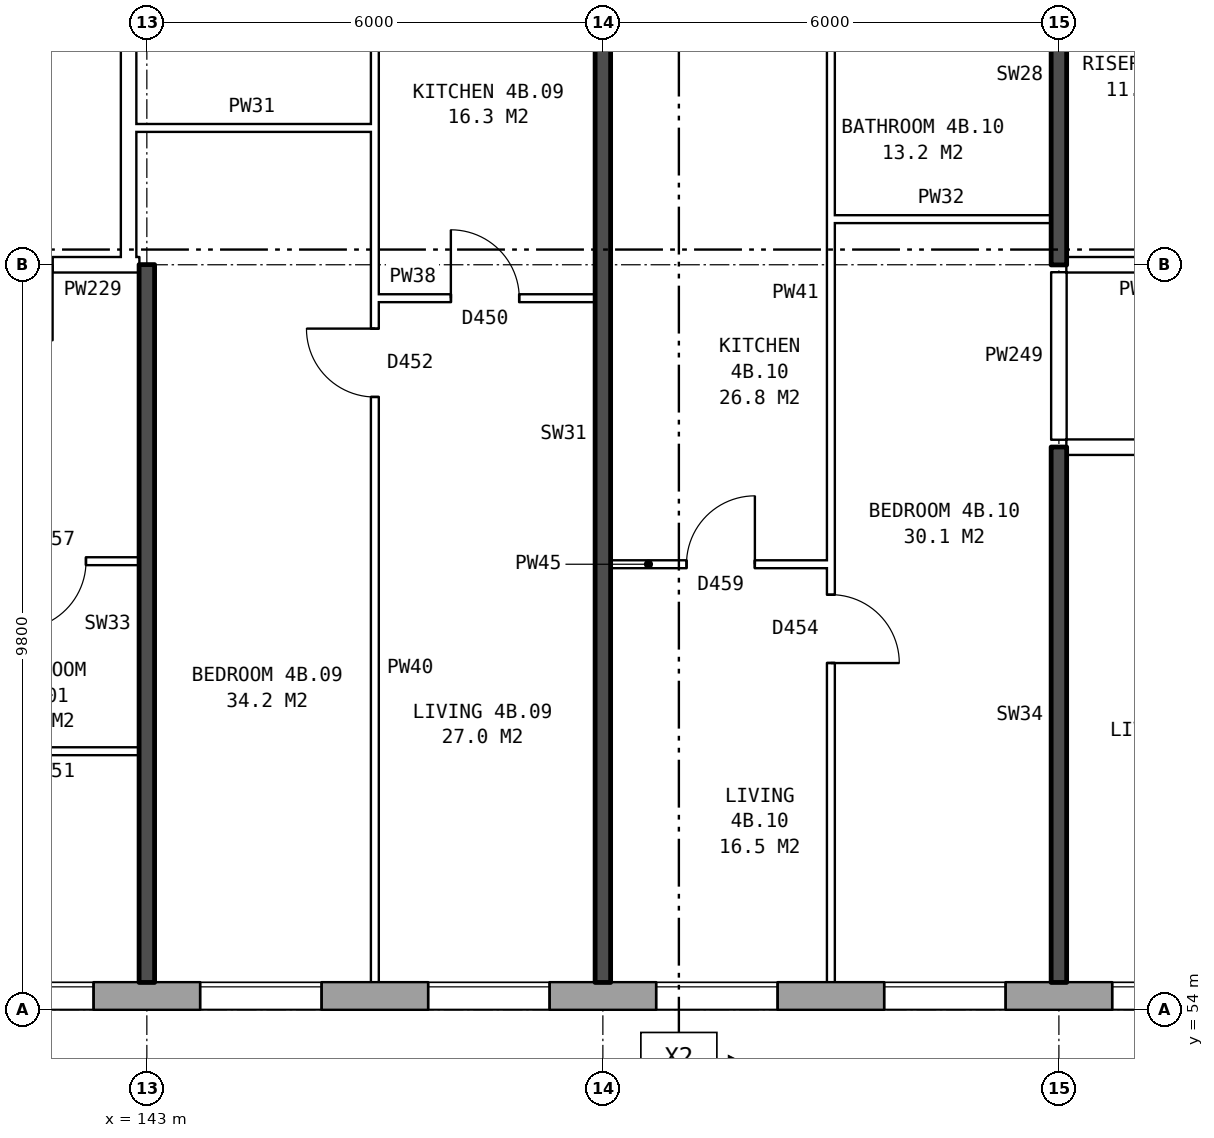
"""IFC4 building model, lengths in metres.
Left out: names, types, materials, properties, quantities, classifications, styles, units other than length and angle.
Written with IfcOpenShell. Run it as: python <this file> out.ifc"""

import sys

from ifc_helpers import new_model, si_unit, direction, frame, frame_2d, origin, place, context, subcontext, project, spatial, rectangle, extrude, element, fill, save


model = new_model("IFC4")
c1 = context("Model", 3, precision=1e-05, world=origin(), true_north=direction((0.0, 1.0)))
c2 = subcontext(c1, "Body", "Model", "MODEL_VIEW")
j1 = project(units=[si_unit("LENGTHUNIT", "METRE"), si_unit("PLANEANGLEUNIT", "RADIAN")], contexts=[c1])
p1 = place(None, origin())
s1 = spatial("IfcSite", under=j1, at=p1, CompositionType="ELEMENT")
p2 = place(p1, origin())
s2 = spatial("IfcBuilding", under=s1, at=p2, CompositionType="ELEMENT")
p3 = place(p2, frame((0.0, 0.0, 19.5)))
s3 = spatial("IfcBuildingStorey", under=s2, at=p3, CompositionType="ELEMENT", Elevation=19.5)
p4 = place(p3, frame((134.075, 54.18, 0.0), z_axis=(0.0, 0.0, 1.0), x_axis=(1.0, 0.0, 0.0)))
e1 = element("IfcWall", 1, at=p4, inside=s3, PredefinedType="STANDARD", context=c2, shape_type="SweptSolid", body=[
    extrude(rectangle(XDim=40.601, YDim=0.36, at=frame_2d((20.3, 0.0))), origin(), (0.0, 0.0, 1.0), 2.85),
])
p5 = place(p4, frame((0.3, 0.0, 0.8)))
e2 = element("IfcOpeningElement", 2, at=p5, cuts=e1, PredefinedType="OPENING", context=c2, shape_type="SweptSolid", body=[
    extrude(rectangle(XDim=0.8, YDim=0.9, at=frame_2d((0.4, 0.45))), frame((0.0, 0.19, 0.0), z_axis=(0.0, -1.0, 0.0), x_axis=(1.0, 0.0, 0.0)), (0.0, 0.0, 1.0), 0.38),
])
p6 = place(p4, frame((3.625, 0.0, 0.8)))
e3 = element("IfcOpeningElement", 3, at=p6, cuts=e1, PredefinedType="OPENING", context=c2, shape_type="SweptSolid", body=[
    extrude(rectangle(XDim=1.6, YDim=1.8, at=frame_2d((0.8, 0.9))), frame((0.0, 0.19, 0.0), z_axis=(0.0, -1.0, 0.0), x_axis=(1.0, 0.0, 0.0)), (0.0, 0.0, 1.0), 0.38),
])
p7 = place(p4, frame((6.625, 0.0, 0.8)))
e4 = element("IfcOpeningElement", 4, at=p7, cuts=e1, PredefinedType="OPENING", context=c2, shape_type="SweptSolid", body=[
    extrude(rectangle(XDim=1.6, YDim=1.8, at=frame_2d((0.8, 0.9))), frame((0.0, 0.19, 0.0), z_axis=(0.0, -1.0, 0.0), x_axis=(1.0, 0.0, 0.0)), (0.0, 0.0, 1.0), 0.38),
])
p8 = place(p4, frame((9.625, 0.0, 0.8)))
e5 = element("IfcOpeningElement", 5, at=p8, cuts=e1, PredefinedType="OPENING", context=c2, shape_type="SweptSolid", body=[
    extrude(rectangle(XDim=1.6, YDim=1.8, at=frame_2d((0.8, 0.9))), frame((0.0, 0.19, 0.0), z_axis=(0.0, -1.0, 0.0), x_axis=(1.0, 0.0, 0.0)), (0.0, 0.0, 1.0), 0.38),
])
p9 = place(p4, frame((12.625, 0.0, 0.8)))
e6 = element("IfcOpeningElement", 6, at=p9, cuts=e1, PredefinedType="OPENING", context=c2, shape_type="SweptSolid", body=[
    extrude(rectangle(XDim=1.6, YDim=1.8, at=frame_2d((0.8, 0.9))), frame((0.0, 0.19, 0.0), z_axis=(0.0, -1.0, 0.0), x_axis=(1.0, 0.0, 0.0)), (0.0, 0.0, 1.0), 0.38),
])
p10 = place(p4, frame((15.625, 0.0, 0.8)))
e7 = element("IfcOpeningElement", 7, at=p10, cuts=e1, PredefinedType="OPENING", context=c2, shape_type="SweptSolid", body=[
    extrude(rectangle(XDim=1.6, YDim=1.8, at=frame_2d((0.8, 0.9))), frame((0.0, 0.19, 0.0), z_axis=(0.0, -1.0, 0.0), x_axis=(1.0, 0.0, 0.0)), (0.0, 0.0, 1.0), 0.38),
])
p11 = place(p4, frame((18.625, 0.0, 0.8)))
e8 = element("IfcOpeningElement", 8, at=p11, cuts=e1, PredefinedType="OPENING", context=c2, shape_type="SweptSolid", body=[
    extrude(rectangle(XDim=1.6, YDim=1.8, at=frame_2d((0.8, 0.9))), frame((0.0, 0.19, 0.0), z_axis=(0.0, -1.0, 0.0), x_axis=(1.0, 0.0, 0.0)), (0.0, 0.0, 1.0), 0.38),
])
p12 = place(p4, frame((21.625, 0.0, 0.8)))
e9 = element("IfcOpeningElement", 9, at=p12, cuts=e1, PredefinedType="OPENING", context=c2, shape_type="SweptSolid", body=[
    extrude(rectangle(XDim=1.6, YDim=1.8, at=frame_2d((0.8, 0.9))), frame((0.0, 0.19, 0.0), z_axis=(0.0, -1.0, 0.0), x_axis=(1.0, 0.0, 0.0)), (0.0, 0.0, 1.0), 0.38),
])
p13 = place(p4, frame((24.625, 0.0, 0.8)))
e10 = element("IfcOpeningElement", 10, at=p13, cuts=e1, PredefinedType="OPENING", context=c2, shape_type="SweptSolid", body=[
    extrude(rectangle(XDim=1.6, YDim=1.8, at=frame_2d((0.8, 0.9))), frame((0.0, 0.19, 0.0), z_axis=(0.0, -1.0, 0.0), x_axis=(1.0, 0.0, 0.0)), (0.0, 0.0, 1.0), 0.38),
])
p14 = place(p4, frame((27.625, 0.0, 0.8)))
e11 = element("IfcOpeningElement", 11, at=p14, cuts=e1, PredefinedType="OPENING", context=c2, shape_type="SweptSolid", body=[
    extrude(rectangle(XDim=1.6, YDim=1.8, at=frame_2d((0.8, 0.9))), frame((0.0, 0.19, 0.0), z_axis=(0.0, -1.0, 0.0), x_axis=(1.0, 0.0, 0.0)), (0.0, 0.0, 1.0), 0.38),
])
p15 = place(p4, frame((30.625, 0.0, 0.8)))
e12 = element("IfcOpeningElement", 12, at=p15, cuts=e1, PredefinedType="OPENING", context=c2, shape_type="SweptSolid", body=[
    extrude(rectangle(XDim=1.6, YDim=1.8, at=frame_2d((0.8, 0.9))), frame((0.0, 0.19, 0.0), z_axis=(0.0, -1.0, 0.0), x_axis=(1.0, 0.0, 0.0)), (0.0, 0.0, 1.0), 0.38),
])
p16 = place(p4, frame((33.625, 0.0, 0.8)))
e13 = element("IfcOpeningElement", 13, at=p16, cuts=e1, PredefinedType="OPENING", context=c2, shape_type="SweptSolid", body=[
    extrude(rectangle(XDim=1.6, YDim=1.8, at=frame_2d((0.8, 0.9))), frame((0.0, 0.19, 0.0), z_axis=(0.0, -1.0, 0.0), x_axis=(1.0, 0.0, 0.0)), (0.0, 0.0, 1.0), 0.38),
])
p17 = place(p4, frame((36.625, 0.0, 0.8)))
e14 = element("IfcOpeningElement", 14, at=p17, cuts=e1, PredefinedType="OPENING", context=c2, shape_type="SweptSolid", body=[
    extrude(rectangle(XDim=1.6, YDim=1.8, at=frame_2d((0.8, 0.9))), frame((0.0, 0.19, 0.0), z_axis=(0.0, -1.0, 0.0), x_axis=(1.0, 0.0, 0.0)), (0.0, 0.0, 1.0), 0.38),
])
p18 = place(p4, frame((1.4, 0.0, 0.8)))
e15 = element("IfcOpeningElement", 15, at=p18, cuts=e1, PredefinedType="OPENING", context=c2, shape_type="SweptSolid", body=[
    extrude(rectangle(XDim=1.2, YDim=1.8, at=frame_2d((0.6, 0.9))), frame((0.0, 0.19, 0.0), z_axis=(0.0, -1.0, 0.0), x_axis=(1.0, 0.0, 0.0)), (0.0, 0.0, 1.0), 0.38),
])
p19 = place(p3, frame((142.76, 63.9, 0.0), z_axis=(0.0, 0.0, 1.0), x_axis=(0.0, 1.0, 0.0)))
e16 = element("IfcWall", 16, at=p19, inside=s3, PredefinedType="PARTITIONING", context=c2, shape_type="SweptSolid", body=[
    extrude(rectangle(XDim=12.2, YDim=0.2, at=frame_2d((6.1, 0.0))), origin(), (0.0, 0.0, 1.0), 2.85),
])
p20 = place(p19, frame((5.1, 0.0, 0.0)))
e17 = element("IfcOpeningElement", 17, at=p20, cuts=e16, PredefinedType="OPENING", context=c2, shape_type="SweptSolid", body=[
    extrude(rectangle(XDim=2.0, YDim=2.1, at=frame_2d((1.0, 1.05))), frame((0.0, 0.11, 0.0), z_axis=(0.0, -1.0, 0.0), x_axis=(1.0, 0.0, 0.0)), (0.0, 0.0, 1.0), 0.22),
])
p21 = place(p3, frame((140.6, 57.4, 0.0), z_axis=(0.0, 0.0, 1.0), x_axis=(1.0, 0.0, 0.0)))
e18 = element("IfcWall", 18, at=p21, inside=s3, PredefinedType="PARTITIONING", context=c2, shape_type="SweptSolid", body=[
    extrude(rectangle(XDim=2.3, YDim=0.1, at=frame_2d((1.15, 0.0))), origin(), (0.0, 0.0, 1.0), 2.85),
])
p22 = place(p3, frame((149.1, 59.86, 0.0), z_axis=(0.0, 0.0, 1.0), x_axis=(1.0, 0.0, 0.0)))
e19 = element("IfcWall", 19, at=p22, inside=s3, PredefinedType="PARTITIONING", context=c2, shape_type="SweptSolid", body=[
    extrude(rectangle(XDim=2.9, YDim=0.1, at=frame_2d((1.45, 0.0))), origin(), (0.0, 0.0, 1.0), 2.85),
])
p23 = place(p22, frame((1.0, 0.0, 0.0)))
e20 = element("IfcOpeningElement", 20, at=p23, cuts=e19, PredefinedType="OPENING", context=c2, shape_type="SweptSolid", body=[
    extrude(rectangle(XDim=0.9, YDim=2.1, at=frame_2d((0.45, 1.05))), frame((0.0, 0.06, 0.0), z_axis=(0.0, -1.0, 0.0), x_axis=(1.0, 0.0, 0.0)), (0.0, 0.0, 1.0), 0.12),
])
p24 = place(p3, frame((137.1, 59.9, 0.0), z_axis=(0.0, 0.0, 1.0), x_axis=(1.0, 0.0, 0.0)))
e21 = element("IfcWall", 21, at=p24, inside=s3, PredefinedType="PARTITIONING", context=c2, shape_type="SweptSolid", body=[
    extrude(rectangle(XDim=5.8, YDim=0.1, at=frame_2d((2.9, 0.0))), origin(), (0.0, 0.0, 1.0), 2.85),
])
p25 = place(p24, frame((1.3, 0.0, 0.0)))
e22 = element("IfcOpeningElement", 22, at=p25, cuts=e21, PredefinedType="OPENING", context=c2, shape_type="SweptSolid", body=[
    extrude(rectangle(XDim=0.9, YDim=2.1, at=frame_2d((0.45, 1.05))), frame((0.0, 0.06, 0.0), z_axis=(0.0, -1.0, 0.0), x_axis=(1.0, 0.0, 0.0)), (0.0, 0.0, 1.0), 0.12),
])
p26 = place(p24, frame((4.2, 0.0, 0.0)))
e23 = element("IfcOpeningElement", 23, at=p26, cuts=e21, PredefinedType="OPENING", context=c2, shape_type="SweptSolid", body=[
    extrude(rectangle(XDim=0.9, YDim=2.1, at=frame_2d((0.45, 1.05))), frame((0.0, 0.06, 0.0), z_axis=(0.0, -1.0, 0.0), x_axis=(1.0, 0.0, 0.0)), (0.0, 0.0, 1.0), 0.12),
])
p27 = place(p3, frame((155.1, 61.4, 0.0), z_axis=(0.0, 0.0, 1.0), x_axis=(1.0, 0.0, 0.0)))
e24 = element("IfcWall", 24, at=p27, inside=s3, PredefinedType="PARTITIONING", context=c2, shape_type="SweptSolid", body=[
    extrude(rectangle(XDim=22.29, YDim=0.2, at=frame_2d((11.145, 0.0))), origin(), (0.0, 0.0, 1.0), 2.85),
])
p28 = place(p27, frame((2.45, 0.0, 0.0)))
e25 = element("IfcOpeningElement", 25, at=p28, cuts=e24, PredefinedType="OPENING", context=c2, shape_type="SweptSolid", body=[
    extrude(rectangle(XDim=1.0, YDim=2.1, at=frame_2d((0.5, 1.05))), frame((0.0, 0.11, 0.0), z_axis=(0.0, -1.0, 0.0), x_axis=(1.0, 0.0, 0.0)), (0.0, 0.0, 1.0), 0.22),
])
p29 = place(p27, frame((14.4, 0.0, 0.0)))
e26 = element("IfcOpeningElement", 26, at=p29, cuts=e24, PredefinedType="OPENING", context=c2, shape_type="SweptSolid", body=[
    extrude(rectangle(XDim=1.0, YDim=2.1, at=frame_2d((0.5, 1.05))), frame((0.0, 0.11, 0.0), z_axis=(0.0, -1.0, 0.0), x_axis=(1.0, 0.0, 0.0)), (0.0, 0.0, 1.0), 0.22),
])
p30 = place(p3, frame((146.0, 63.36, 0.0), z_axis=(0.0, 0.0, 1.0), x_axis=(1.0, 0.0, 0.0)))
e27 = element("IfcWall", 27, at=p30, inside=s3, PredefinedType="PARTITIONING", context=c2, shape_type="SweptSolid", body=[
    extrude(rectangle(XDim=2.9, YDim=0.1, at=frame_2d((1.45, 0.0))), origin(), (0.0, 0.0, 1.0), 2.85),
])
p31 = place(p30, frame((1.0, 0.0, 0.0)))
e28 = element("IfcOpeningElement", 28, at=p31, cuts=e27, PredefinedType="OPENING", context=c2, shape_type="SweptSolid", body=[
    extrude(rectangle(XDim=0.9, YDim=2.1, at=frame_2d((0.45, 1.05))), frame((0.0, 0.06, 0.0), z_axis=(0.0, -1.0, 0.0), x_axis=(1.0, 0.0, 0.0)), (0.0, 0.0, 1.0), 0.12),
])
p32 = place(p3, frame((139.76, 63.8, 0.0), z_axis=(0.0, 0.0, 1.0), x_axis=(1.0, 0.0, 0.0)))
e29 = element("IfcWall", 29, at=p32, inside=s3, PredefinedType="PARTITIONING", context=c2, shape_type="SweptSolid", body=[
    extrude(rectangle(XDim=3.0, YDim=0.2, at=frame_2d((1.5, 0.0))), origin(), (0.0, 0.0, 1.0), 2.85),
])
p33 = place(p32, frame((1.0, 0.0, 0.0)))
e30 = element("IfcOpeningElement", 30, at=p33, cuts=e29, PredefinedType="OPENING", context=c2, shape_type="SweptSolid", body=[
    extrude(rectangle(XDim=1.0, YDim=2.1, at=frame_2d((0.5, 1.05))), frame((0.0, 0.11, 0.0), z_axis=(0.0, -1.0, 0.0), x_axis=(1.0, 0.0, 0.0)), (0.0, 0.0, 1.0), 0.22),
])
p34 = place(p3, frame((142.76, 63.8, 0.0), z_axis=(0.0, 0.0, 1.0), x_axis=(1.0, 0.0, 0.0)))
e31 = element("IfcWall", 31, at=p34, inside=s3, PredefinedType="PARTITIONING", context=c2, shape_type="SweptSolid", body=[
    extrude(rectangle(XDim=0.14, YDim=0.2, at=frame_2d((0.07, 0.0))), origin(), (0.0, 0.0, 1.0), 2.85),
])
p35 = place(p3, frame((155.1, 63.8, 0.0), z_axis=(0.0, 0.0, 1.0), x_axis=(1.0, 0.0, 0.0)))
e32 = element("IfcWall", 32, at=p35, inside=s3, PredefinedType="PARTITIONING", context=c2, shape_type="SweptSolid", body=[
    extrude(rectangle(XDim=2.14, YDim=0.2, at=frame_2d((1.07, 0.0))), origin(), (0.0, 0.0, 1.0), 2.85),
])
p36 = place(p3, frame((152.0, 64.4, 0.0), z_axis=(0.0, 0.0, 1.0), x_axis=(1.0, 0.0, 0.0)))
e33 = element("IfcWall", 33, at=p36, inside=s3, PredefinedType="PARTITIONING", context=c2, shape_type="SweptSolid", body=[
    extrude(rectangle(XDim=2.9, YDim=0.1, at=frame_2d((1.45, 0.0))), origin(), (0.0, 0.0, 1.0), 2.85),
])
p37 = place(p3, frame((142.76, 65.6, 0.0), z_axis=(0.0, 0.0, 1.0), x_axis=(1.0, 0.0, 0.0)))
e34 = element("IfcWall", 34, at=p37, inside=s3, PredefinedType="PARTITIONING", context=c2, shape_type="SweptSolid", body=[
    extrude(rectangle(XDim=3.24, YDim=0.1, at=frame_2d((1.62, 0.0))), origin(), (0.0, 0.0, 1.0), 2.85),
])
p38 = place(p3, frame((143.0, 54.36, 0.0), z_axis=(0.0, 0.0, 1.0), x_axis=(0.0, 1.0, 0.0)))
e35 = element("IfcWall", 35, at=p38, inside=s3, PredefinedType="SOLIDWALL", context=c2, shape_type="SweptSolid", body=[
    extrude(rectangle(XDim=9.44, YDim=0.2, at=frame_2d((4.72, 0.0))), origin(), (0.0, 0.0, 1.0), 2.85),
])
p39 = place(p3, frame((146.0, 54.36, 0.0), z_axis=(0.0, 0.0, 1.0), x_axis=(0.0, 1.0, 0.0)))
e36 = element("IfcWall", 36, at=p39, inside=s3, PredefinedType="PARTITIONING", context=c2, shape_type="SweptSolid", body=[
    extrude(rectangle(XDim=14.34, YDim=0.1, at=frame_2d((7.17, 0.0))), origin(), (0.0, 0.0, 1.0), 2.85),
])
p40 = place(p39, frame((7.7, 0.0, 0.0)))
e37 = element("IfcOpeningElement", 37, at=p40, cuts=e36, PredefinedType="OPENING", context=c2, shape_type="SweptSolid", body=[
    extrude(rectangle(XDim=0.9, YDim=2.1, at=frame_2d((0.45, 1.05))), frame((0.0, 0.06, 0.0), z_axis=(0.0, -1.0, 0.0), x_axis=(1.0, 0.0, 0.0)), (0.0, 0.0, 1.0), 0.12),
])
p41 = place(p39, frame((13.04, 0.0, 0.0)))
e38 = element("IfcOpeningElement", 38, at=p41, cuts=e36, PredefinedType="OPENING", context=c2, shape_type="SweptSolid", body=[
    extrude(rectangle(XDim=0.9, YDim=2.1, at=frame_2d((0.45, 1.05))), frame((0.0, 0.06, 0.0), z_axis=(0.0, -1.0, 0.0), x_axis=(1.0, 0.0, 0.0)), (0.0, 0.0, 1.0), 0.12),
])
p42 = place(p3, frame((149.0, 54.36, 0.0), z_axis=(0.0, 0.0, 1.0), x_axis=(0.0, 1.0, 0.0)))
e39 = element("IfcWall", 39, at=p42, inside=s3, PredefinedType="SOLIDWALL", context=c2, shape_type="SweptSolid", body=[
    extrude(rectangle(XDim=14.44, YDim=0.2, at=frame_2d((7.22, 0.0))), origin(), (0.0, 0.0, 1.0), 2.85),
])
p43 = place(p3, frame((152.0, 54.36, 0.0), z_axis=(0.0, 0.0, 1.0), x_axis=(0.0, 1.0, 0.0)))
e40 = element("IfcWall", 40, at=p43, inside=s3, PredefinedType="PARTITIONING", context=c2, shape_type="SweptSolid", body=[
    extrude(rectangle(XDim=14.34, YDim=0.1, at=frame_2d((7.17, 0.0))), origin(), (0.0, 0.0, 1.0), 2.85),
])
p44 = place(p43, frame((4.2, 0.0, 0.0)))
e41 = element("IfcOpeningElement", 41, at=p44, cuts=e40, PredefinedType="OPENING", context=c2, shape_type="SweptSolid", body=[
    extrude(rectangle(XDim=0.9, YDim=2.1, at=frame_2d((0.45, 1.05))), frame((0.0, 0.06, 0.0), z_axis=(0.0, -1.0, 0.0), x_axis=(1.0, 0.0, 0.0)), (0.0, 0.0, 1.0), 0.12),
])
p45 = place(p43, frame((13.04, 0.0, 0.0)))
e42 = element("IfcOpeningElement", 42, at=p45, cuts=e40, PredefinedType="OPENING", context=c2, shape_type="SweptSolid", body=[
    extrude(rectangle(XDim=0.9, YDim=2.1, at=frame_2d((0.45, 1.05))), frame((0.0, 0.06, 0.0), z_axis=(0.0, -1.0, 0.0), x_axis=(1.0, 0.0, 0.0)), (0.0, 0.0, 1.0), 0.12),
])
p46 = place(p3, frame((155.0, 54.36, 0.0), z_axis=(0.0, 0.0, 1.0), x_axis=(0.0, 1.0, 0.0)))
e43 = element("IfcWall", 43, at=p46, inside=s3, PredefinedType="SOLIDWALL", context=c2, shape_type="SweptSolid", body=[
    extrude(rectangle(XDim=7.04, YDim=0.2, at=frame_2d((3.52, 0.0))), origin(), (0.0, 0.0, 1.0), 2.85),
])
p47 = place(p3, frame((155.0, 61.5, 0.0), z_axis=(0.0, 0.0, 1.0), x_axis=(0.0, 1.0, 0.0)))
e44 = element("IfcWall", 44, at=p47, inside=s3, PredefinedType="PARTITIONING", context=c2, shape_type="SweptSolid", body=[
    extrude(rectangle(XDim=2.2, YDim=0.2, at=frame_2d((1.1, 0.0))), origin(), (0.0, 0.0, 1.0), 2.85),
])
p48 = place(p3, frame((155.0, 63.8, 0.0), z_axis=(0.0, 0.0, 1.0), x_axis=(0.0, 1.0, 0.0)))
e45 = element("IfcWall", 45, at=p48, inside=s3, PredefinedType="SOLIDWALL", context=c2, shape_type="SweptSolid", body=[
    extrude(rectangle(XDim=5.0, YDim=0.2, at=frame_2d((2.5, 0.0))), origin(), (0.0, 0.0, 1.0), 2.85),
])
p49 = place(p7, origin())
e46 = element("IfcWindow", 46, at=p49, inside=s3, PartitioningType="SINGLE_PANEL", PredefinedType="WINDOW", context=c2, shape_type="SweptSolid", body=[
    extrude(rectangle(XDim=1.6, YDim=1.8, at=frame_2d((0.8, 0.9))), frame((0.0, 0.15, 0.0), z_axis=(0.0, -1.0, 0.0), x_axis=(1.0, 0.0, 0.0)), (0.0, 0.0, 1.0), 0.06),
])
fill(e4, e46)
p50 = place(p8, origin())
e47 = element("IfcWindow", 47, at=p50, inside=s3, PartitioningType="SINGLE_PANEL", PredefinedType="WINDOW", context=c2, shape_type="SweptSolid", body=[
    extrude(rectangle(XDim=1.6, YDim=1.8, at=frame_2d((0.8, 0.9))), frame((0.0, 0.15, 0.0), z_axis=(0.0, -1.0, 0.0), x_axis=(1.0, 0.0, 0.0)), (0.0, 0.0, 1.0), 0.06),
])
fill(e5, e47)
p51 = place(p9, origin())
e48 = element("IfcWindow", 48, at=p51, inside=s3, PartitioningType="SINGLE_PANEL", PredefinedType="WINDOW", context=c2, shape_type="SweptSolid", body=[
    extrude(rectangle(XDim=1.6, YDim=1.8, at=frame_2d((0.8, 0.9))), frame((0.0, 0.15, 0.0), z_axis=(0.0, -1.0, 0.0), x_axis=(1.0, 0.0, 0.0)), (0.0, 0.0, 1.0), 0.06),
])
fill(e6, e48)
p52 = place(p10, origin())
e49 = element("IfcWindow", 49, at=p52, inside=s3, PartitioningType="SINGLE_PANEL", PredefinedType="WINDOW", context=c2, shape_type="SweptSolid", body=[
    extrude(rectangle(XDim=1.6, YDim=1.8, at=frame_2d((0.8, 0.9))), frame((0.0, 0.15, 0.0), z_axis=(0.0, -1.0, 0.0), x_axis=(1.0, 0.0, 0.0)), (0.0, 0.0, 1.0), 0.06),
])
fill(e7, e49)
p53 = place(p11, origin())
e50 = element("IfcWindow", 50, at=p53, inside=s3, PartitioningType="SINGLE_PANEL", PredefinedType="WINDOW", context=c2, shape_type="SweptSolid", body=[
    extrude(rectangle(XDim=1.6, YDim=1.8, at=frame_2d((0.8, 0.9))), frame((0.0, 0.15, 0.0), z_axis=(0.0, -1.0, 0.0), x_axis=(1.0, 0.0, 0.0)), (0.0, 0.0, 1.0), 0.06),
])
fill(e8, e50)
p54 = place(p12, origin())
e51 = element("IfcWindow", 51, at=p54, inside=s3, PartitioningType="SINGLE_PANEL", PredefinedType="WINDOW", context=c2, shape_type="SweptSolid", body=[
    extrude(rectangle(XDim=1.6, YDim=1.8, at=frame_2d((0.8, 0.9))), frame((0.0, 0.15, 0.0), z_axis=(0.0, -1.0, 0.0), x_axis=(1.0, 0.0, 0.0)), (0.0, 0.0, 1.0), 0.06),
])
fill(e9, e51)
p55 = place(p26, frame((0.9, 0.0, 0.0), z_axis=(0.0, 0.0, 1.0), x_axis=(-1.0, 0.0, 0.0)))
e52 = element("IfcDoor", 52, at=p55, inside=s3, OperationType="SINGLE_SWING_RIGHT", PredefinedType="DOOR", context=c2, shape_type="SweptSolid", body=[
    extrude(rectangle(XDim=0.9, YDim=2.1, at=frame_2d((0.45, 1.05))), frame((0.0, 0.025, 0.0), z_axis=(0.0, -1.0, 0.0), x_axis=(1.0, 0.0, 0.0)), (0.0, 0.0, 1.0), 0.05),
])
fill(e23, e52)
p56 = place(p40, origin())
e53 = element("IfcDoor", 53, at=p56, inside=s3, OperationType="SINGLE_SWING_RIGHT", PredefinedType="DOOR", context=c2, shape_type="SweptSolid", body=[
    extrude(rectangle(XDim=0.9, YDim=2.1, at=frame_2d((0.45, 1.05))), frame((0.0, 0.025, 0.0), z_axis=(0.0, -1.0, 0.0), x_axis=(1.0, 0.0, 0.0)), (0.0, 0.0, 1.0), 0.05),
])
fill(e37, e53)
p57 = place(p31, origin())
e54 = element("IfcDoor", 54, at=p57, inside=s3, OperationType="SINGLE_SWING_LEFT", PredefinedType="DOOR", context=c2, shape_type="SweptSolid", body=[
    extrude(rectangle(XDim=0.9, YDim=2.1, at=frame_2d((0.45, 1.05))), frame((0.0, 0.025, 0.0), z_axis=(0.0, -1.0, 0.0), x_axis=(1.0, 0.0, 0.0)), (0.0, 0.0, 1.0), 0.05),
])
fill(e28, e54)
p58 = place(p44, frame((0.9, 0.0, 0.0), z_axis=(0.0, 0.0, 1.0), x_axis=(-1.0, 0.0, 0.0)))
e55 = element("IfcDoor", 55, at=p58, inside=s3, OperationType="SINGLE_SWING_RIGHT", PredefinedType="DOOR", context=c2, shape_type="SweptSolid", body=[
    extrude(rectangle(XDim=0.9, YDim=2.1, at=frame_2d((0.45, 1.05))), frame((0.0, 0.025, 0.0), z_axis=(0.0, -1.0, 0.0), x_axis=(1.0, 0.0, 0.0)), (0.0, 0.0, 1.0), 0.05),
])
fill(e41, e55)
p59 = place(p23, origin())
e56 = element("IfcDoor", 56, at=p59, inside=s3, OperationType="SINGLE_SWING_RIGHT", PredefinedType="DOOR", context=c2, shape_type="SweptSolid", body=[
    extrude(rectangle(XDim=0.9, YDim=2.1, at=frame_2d((0.45, 1.05))), frame((0.0, 0.025, 0.0), z_axis=(0.0, -1.0, 0.0), x_axis=(1.0, 0.0, 0.0)), (0.0, 0.0, 1.0), 0.05),
])
fill(e20, e56)
save(model, sys.argv[1])
